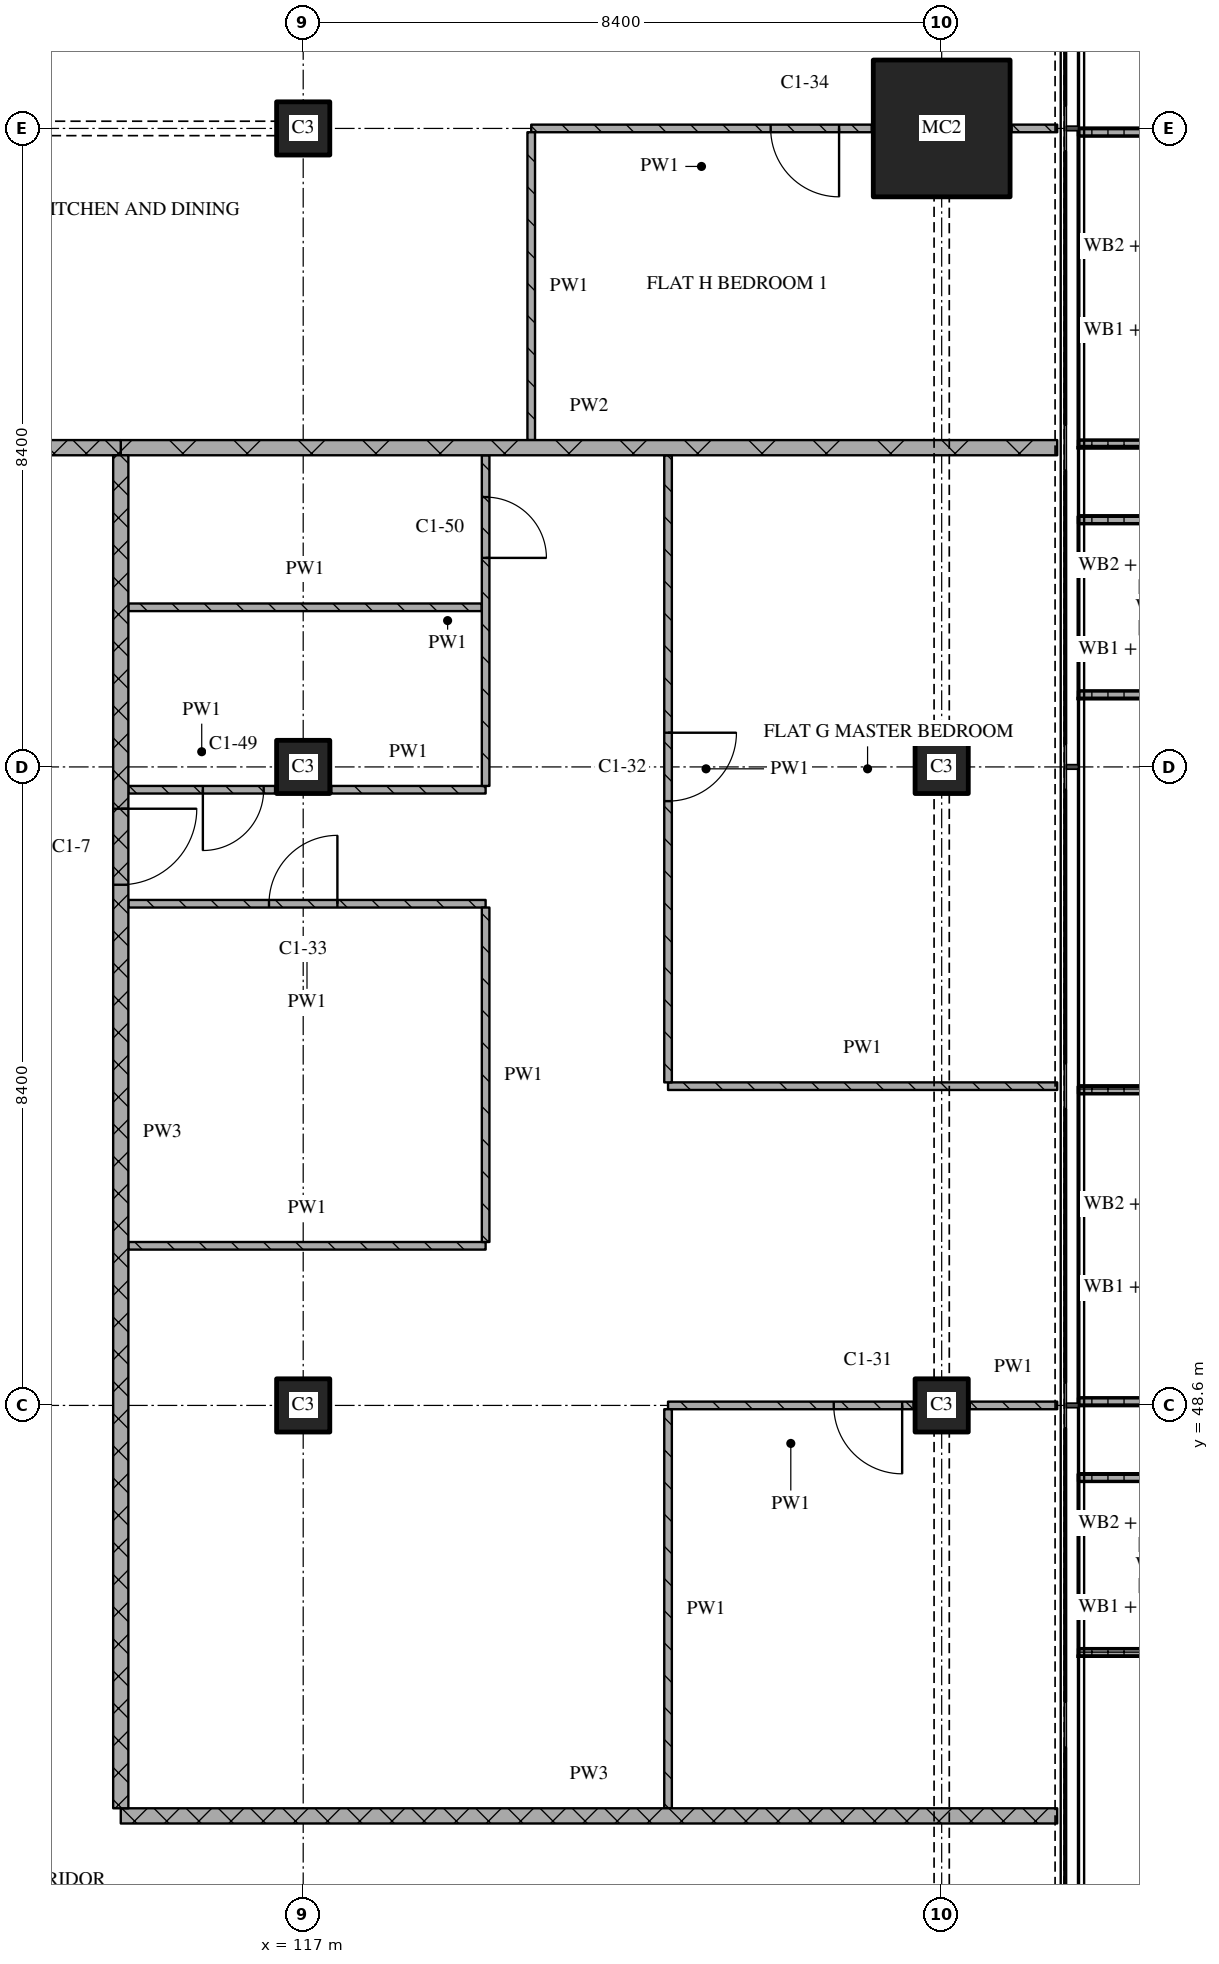
"""IFC4 building model, lengths in metres.
Left out: names, types, materials, properties, quantities, classifications, styles, units other than length and angle.
Written with IfcOpenShell. Run it as: python <this file> out.ifc"""

import sys

from ifc_helpers import new_model, si_unit, direction, frame, frame_2d, origin, origin_2d, place, context, subcontext, project, spatial, polyline, rectangle, outline, extrude, element, fill, save


model = new_model("IFC4")
c1 = context("Model", 3, precision=1e-05, world=origin(), true_north=direction((0.0, 1.0)))
c2 = subcontext(c1, "Body", "Model", "MODEL_VIEW")
j1 = project(units=[si_unit("LENGTHUNIT", "METRE"), si_unit("PLANEANGLEUNIT", "RADIAN")], contexts=[c1])
p1 = place(None, origin())
s1 = spatial("IfcSite", under=j1, at=p1, CompositionType="ELEMENT")
p2 = place(p1, origin())
s2 = spatial("IfcBuilding", under=s1, at=p2, CompositionType="ELEMENT")
p3 = place(p2, frame((0.0, 0.0, 151.05)))
s3 = spatial("IfcBuildingStorey", under=s2, at=p3, CompositionType="ELEMENT", Elevation=151.05)
for number, where, z_axis, x_axis in (
    (1, (117.0, 48.6, 0.0), (0.0, 0.0, 1.0), (1.0, 0.0, 0.0)),
    (2, (117.0, 57.0, 0.0), (0.0, 0.0, 1.0), (1.0, 0.0, 0.0)),
    (3, (117.0, 65.4, 0.0), (0.0, 0.0, 1.0), (1.0, 0.0, 0.0)),
    (4, (125.4, 48.6, 0.0), (0.0, 0.0, 1.0), (1.0, 0.0, 0.0)),
    (5, (125.4, 57.0, 0.0), (0.0, 0.0, 1.0), (1.0, 0.0, 0.0)),
):
    element("IfcColumn", number, at=place(p3, frame(where, z_axis=z_axis, x_axis=x_axis)), inside=s3, PredefinedType="COLUMN", context=c2, shape_type="SweptSolid", body=[
        extrude(rectangle(XDim=0.7, YDim=0.7, at=origin_2d()), origin(), (0.0, 0.0, 1.0), 3.6),
    ])
p4 = place(p3, frame((125.4, 65.4, 0.0), z_axis=(0.0, 0.0, 1.0), x_axis=(1.0, 0.0, 0.0)))
e6 = element("IfcColumn", 6, at=p4, inside=s3, PredefinedType="COLUMN", context=c2, shape_type="SweptSolid", body=[
    extrude(rectangle(XDim=1.8, YDim=1.8, at=origin_2d()), origin(), (0.0, 0.0, 1.0), 3.6),
])
p5 = place(p3, origin())
e7 = element("IfcWall", 7, at=p5, inside=s3, PredefinedType="SOLIDWALL", context=c2, shape_type="SweptSolid", body=[
    extrude(outline(polyline([(127.2, 45.3), (127.2, 45.4), (128.7, 45.4), (128.7, 47.6), (127.2, 47.6), (127.2, 47.7), (128.8, 47.7), (128.8, 45.3), (127.2, 45.3)])), origin(), (0.0, 0.0, 1.0), 1.0),
])
p6 = place(p3, origin())
e8 = element("IfcWall", 8, at=p6, inside=s3, PredefinedType="SOLIDWALL", context=c2, shape_type="SweptSolid", body=[
    extrude(outline(polyline([(127.2, 48.6), (127.2, 48.7), (128.833, 48.7), (128.833, 52.7), (127.2, 52.7), (127.2, 52.8), (128.933, 52.8), (128.933, 48.6), (127.2, 48.6)])), origin(), (0.0, 0.0, 1.0), 1.0),
])
p7 = place(p3, origin())
e9 = element("IfcWall", 9, at=p7, inside=s3, PredefinedType="SOLIDWALL", context=c2, shape_type="SweptSolid", body=[
    extrude(outline(polyline([(127.2, 57.9), (127.2, 58.0), (128.7, 58.0), (128.7, 60.2), (127.2, 60.2), (127.2, 60.3), (128.8, 60.3), (128.8, 57.9), (127.2, 57.9)])), origin(), (0.0, 0.0, 1.0), 1.0),
])
p8 = place(p3, origin())
e10 = element("IfcWall", 10, at=p8, inside=s3, PredefinedType="SOLIDWALL", context=c2, shape_type="SweptSolid", body=[
    extrude(outline(polyline([(127.2, 61.2), (127.2, 61.3), (128.833, 61.3), (128.833, 65.3), (127.2, 65.3), (127.2, 65.4), (128.933, 65.4), (128.933, 61.2), (127.2, 61.2)])), origin(), (0.0, 0.0, 1.0), 1.0),
])
p9 = place(p3, frame((114.6, 43.2, 0.0), z_axis=(0.0, 0.0, 1.0), x_axis=(1.0, 0.0, 0.0)))
e11 = element("IfcWall", 11, at=p9, inside=s3, PredefinedType="PARTITIONING", context=c2, shape_type="SweptSolid", body=[
    extrude(rectangle(XDim=12.32, YDim=0.2, at=frame_2d((6.16, 0.0))), origin(), (0.0, 0.0, 1.0), 3.32),
])
p10 = place(p3, frame((125.03, 48.6, 0.0), z_axis=(0.0, 0.0, 1.0), x_axis=(-1.0, 0.0, 0.0)))
e12 = element("IfcWall", 12, at=p10, inside=s3, PredefinedType="PARTITIONING", context=c2, shape_type="SweptSolid", body=[
    extrude(rectangle(XDim=3.23, YDim=0.1, at=frame_2d((1.615, 0.0))), origin(), (0.0, 0.0, 1.0), 3.32),
])
p11 = place(p10, frame((0.15, 0.0, 0.0)))
e13 = element("IfcOpeningElement", 13, at=p11, cuts=e12, PredefinedType="OPENING", context=c2, shape_type="SweptSolid", body=[
    extrude(rectangle(XDim=0.9, YDim=2.1, at=frame_2d((0.45, 1.05))), frame((0.0, 0.06, 0.0), z_axis=(0.0, -1.0, 0.0), x_axis=(1.0, 0.0, 0.0)), (0.0, 0.0, 1.0), 0.12),
])
p12 = place(p3, frame((125.77, 48.6, 0.0), z_axis=(0.0, 0.0, 1.0), x_axis=(1.0, 0.0, 0.0)))
e14 = element("IfcWall", 14, at=p12, inside=s3, PredefinedType="PARTITIONING", context=c2, shape_type="SweptSolid", body=[
    extrude(rectangle(XDim=1.15, YDim=0.1, at=frame_2d((0.575, 0.0))), origin(), (0.0, 0.0, 1.0), 3.32),
])
p13 = place(p3, frame((114.7, 50.7, 0.0), z_axis=(0.0, 0.0, 1.0), x_axis=(1.0, 0.0, 0.0)))
e15 = element("IfcWall", 15, at=p13, inside=s3, PredefinedType="PARTITIONING", context=c2, shape_type="SweptSolid", body=[
    extrude(rectangle(XDim=4.7, YDim=0.1, at=frame_2d((2.35, 0.0))), origin(), (0.0, 0.0, 1.0), 3.32),
])
p14 = place(p3, frame((121.8, 52.8, 0.0), z_axis=(0.0, 0.0, 1.0), x_axis=(1.0, 0.0, 0.0)))
e16 = element("IfcWall", 16, at=p14, inside=s3, PredefinedType="PARTITIONING", context=c2, shape_type="SweptSolid", body=[
    extrude(rectangle(XDim=5.12, YDim=0.1, at=frame_2d((2.56, 0.0))), origin(), (0.0, 0.0, 1.0), 3.32),
])
p15 = place(p3, frame((119.4, 55.2, 0.0), z_axis=(0.0, 0.0, 1.0), x_axis=(-1.0, 0.0, 0.0)))
e17 = element("IfcWall", 17, at=p15, inside=s3, PredefinedType="PARTITIONING", context=c2, shape_type="SweptSolid", body=[
    extrude(rectangle(XDim=4.7, YDim=0.1, at=frame_2d((2.35, 0.0))), origin(), (0.0, 0.0, 1.0), 3.32),
])
p16 = place(p15, frame((1.95, 0.0, 0.0)))
e18 = element("IfcOpeningElement", 18, at=p16, cuts=e17, PredefinedType="OPENING", context=c2, shape_type="SweptSolid", body=[
    extrude(rectangle(XDim=0.9, YDim=2.1, at=frame_2d((0.45, 1.05))), frame((0.0, 0.06, 0.0), z_axis=(0.0, -1.0, 0.0), x_axis=(1.0, 0.0, 0.0)), (0.0, 0.0, 1.0), 0.12),
])
p17 = place(p3, frame((114.7, 56.7, 0.0), z_axis=(0.0, 0.0, 1.0), x_axis=(1.0, 0.0, 0.0)))
e19 = element("IfcWall", 19, at=p17, inside=s3, PredefinedType="PARTITIONING", context=c2, shape_type="SweptSolid", body=[
    extrude(rectangle(XDim=1.93, YDim=0.1, at=frame_2d((0.965, 0.0))), origin(), (0.0, 0.0, 1.0), 3.32),
])
p18 = place(p17, frame((0.98, 0.0, 0.0)))
e20 = element("IfcOpeningElement", 20, at=p18, cuts=e19, PredefinedType="OPENING", context=c2, shape_type="SweptSolid", body=[
    extrude(rectangle(XDim=0.8, YDim=2.1, at=frame_2d((0.4, 1.05))), frame((0.0, 0.06, 0.0), z_axis=(0.0, -1.0, 0.0), x_axis=(1.0, 0.0, 0.0)), (0.0, 0.0, 1.0), 0.12),
])
p19 = place(p3, frame((117.37, 56.7, 0.0), z_axis=(0.0, 0.0, 1.0), x_axis=(1.0, 0.0, 0.0)))
e21 = element("IfcWall", 21, at=p19, inside=s3, PredefinedType="PARTITIONING", context=c2, shape_type="SweptSolid", body=[
    extrude(rectangle(XDim=2.03, YDim=0.1, at=frame_2d((1.015, 0.0))), origin(), (0.0, 0.0, 1.0), 3.32),
])
p20 = place(p3, frame((114.7, 59.1, 0.0), z_axis=(0.0, 0.0, 1.0), x_axis=(1.0, 0.0, 0.0)))
e22 = element("IfcWall", 22, at=p20, inside=s3, PredefinedType="PARTITIONING", context=c2, shape_type="SweptSolid", body=[
    extrude(rectangle(XDim=4.65, YDim=0.1, at=frame_2d((2.325, 0.0))), origin(), (0.0, 0.0, 1.0), 3.32),
])
p21 = place(p3, frame((111.0, 61.2, 0.0), z_axis=(0.0, 0.0, 1.0), x_axis=(1.0, 0.0, 0.0)))
e23 = element("IfcWall", 23, at=p21, inside=s3, PredefinedType="PARTITIONING", context=c2, shape_type="SweptSolid", body=[
    extrude(rectangle(XDim=3.6, YDim=0.2, at=frame_2d((1.8, 0.0))), origin(), (0.0, 0.0, 1.0), 3.32),
])
p22 = place(p3, frame((114.6, 61.2, 0.0), z_axis=(0.0, 0.0, 1.0), x_axis=(1.0, 0.0, 0.0)))
e24 = element("IfcWall", 24, at=p22, inside=s3, PredefinedType="PARTITIONING", context=c2, shape_type="SweptSolid", body=[
    extrude(rectangle(XDim=12.32, YDim=0.2, at=frame_2d((6.16, 0.0))), origin(), (0.0, 0.0, 1.0), 3.32),
])
p23 = place(p3, frame((124.48, 65.4, 0.0), z_axis=(0.0, 0.0, 1.0), x_axis=(-1.0, 0.0, 0.0)))
e25 = element("IfcWall", 25, at=p23, inside=s3, PredefinedType="PARTITIONING", context=c2, shape_type="SweptSolid", body=[
    extrude(rectangle(XDim=4.48, YDim=0.1, at=frame_2d((2.24, 0.0))), origin(), (0.0, 0.0, 1.0), 3.32),
])
p24 = place(p23, frame((0.43, 0.0, 0.0)))
e26 = element("IfcOpeningElement", 26, at=p24, cuts=e25, PredefinedType="OPENING", context=c2, shape_type="SweptSolid", body=[
    extrude(rectangle(XDim=0.9, YDim=2.1, at=frame_2d((0.45, 1.05))), frame((0.0, 0.06, 0.0), z_axis=(0.0, -1.0, 0.0), x_axis=(1.0, 0.0, 0.0)), (0.0, 0.0, 1.0), 0.12),
])
p25 = place(p3, frame((126.32, 65.4, 0.0), z_axis=(0.0, 0.0, 1.0), x_axis=(1.0, 0.0, 0.0)))
e27 = element("IfcWall", 27, at=p25, inside=s3, PredefinedType="PARTITIONING", context=c2, shape_type="SweptSolid", body=[
    extrude(rectangle(XDim=0.6, YDim=0.1, at=frame_2d((0.3, 0.0))), origin(), (0.0, 0.0, 1.0), 3.32),
])
p26 = place(p3, frame((114.6, 61.1, 0.0), z_axis=(0.0, 0.0, 1.0), x_axis=(0.0, -1.0, 0.0)))
e28 = element("IfcWall", 28, at=p26, inside=s3, PredefinedType="PARTITIONING", context=c2, shape_type="SweptSolid", body=[
    extrude(rectangle(XDim=17.8, YDim=0.2, at=frame_2d((8.9, 0.0))), origin(), (0.0, 0.0, 1.0), 3.32),
])
p27 = place(p26, frame((4.65, 0.0, 0.0)))
e29 = element("IfcOpeningElement", 29, at=p27, cuts=e28, PredefinedType="OPENING", context=c2, shape_type="SweptSolid", body=[
    extrude(rectangle(XDim=1.0, YDim=2.1, at=frame_2d((0.5, 1.05))), frame((0.0, 0.11, 0.0), z_axis=(0.0, -1.0, 0.0), x_axis=(1.0, 0.0, 0.0)), (0.0, 0.0, 1.0), 0.22),
])
p28 = place(p3, frame((119.4, 55.15, 0.0), z_axis=(0.0, 0.0, 1.0), x_axis=(0.0, -1.0, 0.0)))
e30 = element("IfcWall", 30, at=p28, inside=s3, PredefinedType="PARTITIONING", context=c2, shape_type="SweptSolid", body=[
    extrude(rectangle(XDim=4.4, YDim=0.1, at=frame_2d((2.2, 0.0))), origin(), (0.0, 0.0, 1.0), 3.32),
])
p29 = place(p3, frame((119.4, 56.75, 0.0), z_axis=(0.0, 0.0, 1.0), x_axis=(0.0, 1.0, 0.0)))
e31 = element("IfcWall", 31, at=p29, inside=s3, PredefinedType="PARTITIONING", context=c2, shape_type="SweptSolid", body=[
    extrude(rectangle(XDim=4.35, YDim=0.1, at=frame_2d((2.175, 0.0))), origin(), (0.0, 0.0, 1.0), 3.32),
])
p30 = place(p29, frame((3.0, 0.0, 0.0)))
e32 = element("IfcOpeningElement", 32, at=p30, cuts=e31, PredefinedType="OPENING", context=c2, shape_type="SweptSolid", body=[
    extrude(rectangle(XDim=0.8, YDim=2.1, at=frame_2d((0.4, 1.05))), frame((0.0, 0.06, 0.0), z_axis=(0.0, -1.0, 0.0), x_axis=(1.0, 0.0, 0.0)), (0.0, 0.0, 1.0), 0.12),
])
p31 = place(p3, frame((120.0, 65.35, 0.0), z_axis=(0.0, 0.0, 1.0), x_axis=(0.0, -1.0, 0.0)))
e33 = element("IfcWall", 33, at=p31, inside=s3, PredefinedType="PARTITIONING", context=c2, shape_type="SweptSolid", body=[
    extrude(rectangle(XDim=4.05, YDim=0.1, at=frame_2d((2.025, 0.0))), origin(), (0.0, 0.0, 1.0), 3.32),
])
p32 = place(p3, frame((121.8, 48.55, 0.0), z_axis=(0.0, 0.0, 1.0), x_axis=(0.0, -1.0, 0.0)))
e34 = element("IfcWall", 34, at=p32, inside=s3, PredefinedType="PARTITIONING", context=c2, shape_type="SweptSolid", body=[
    extrude(rectangle(XDim=5.25, YDim=0.1, at=frame_2d((2.625, 0.0))), origin(), (0.0, 0.0, 1.0), 3.32),
])
p33 = place(p3, frame((121.8, 61.1, 0.0), z_axis=(0.0, 0.0, 1.0), x_axis=(0.0, -1.0, 0.0)))
e35 = element("IfcWall", 35, at=p33, inside=s3, PredefinedType="PARTITIONING", context=c2, shape_type="SweptSolid", body=[
    extrude(rectangle(XDim=8.25, YDim=0.1, at=frame_2d((4.125, 0.0))), origin(), (0.0, 0.0, 1.0), 3.32),
])
p34 = place(p33, frame((3.65, 0.0, 0.0)))
e36 = element("IfcOpeningElement", 36, at=p34, cuts=e35, PredefinedType="OPENING", context=c2, shape_type="SweptSolid", body=[
    extrude(rectangle(XDim=0.9, YDim=2.1, at=frame_2d((0.45, 1.05))), frame((0.0, 0.06, 0.0), z_axis=(0.0, -1.0, 0.0), x_axis=(1.0, 0.0, 0.0)), (0.0, 0.0, 1.0), 0.12),
])
p35 = place(p11, origin())
e37 = element("IfcDoor", 37, at=p35, inside=s3, OperationType="SINGLE_SWING_LEFT", PredefinedType="DOOR", context=c2, shape_type="SweptSolid", body=[
    extrude(rectangle(XDim=0.9, YDim=2.1, at=frame_2d((0.45, 1.05))), frame((0.0, 0.025, 0.0), z_axis=(0.0, -1.0, 0.0), x_axis=(1.0, 0.0, 0.0)), (0.0, 0.0, 1.0), 0.05),
])
fill(e13, e37)
p36 = place(p16, origin())
e38 = element("IfcDoor", 38, at=p36, inside=s3, OperationType="SINGLE_SWING_RIGHT", PredefinedType="DOOR", context=c2, shape_type="SweptSolid", body=[
    extrude(rectangle(XDim=0.9, YDim=2.1, at=frame_2d((0.45, 1.05))), frame((0.0, 0.025, 0.0), z_axis=(0.0, -1.0, 0.0), x_axis=(1.0, 0.0, 0.0)), (0.0, 0.0, 1.0), 0.05),
])
fill(e18, e38)
p37 = place(p18, origin())
e39 = element("IfcDoor", 39, at=p37, inside=s3, OperationType="SINGLE_SWING_RIGHT", PredefinedType="DOOR", context=c2, shape_type="SweptSolid", body=[
    extrude(rectangle(XDim=0.8, YDim=2.1, at=frame_2d((0.4, 1.05))), frame((0.0, 0.025, 0.0), z_axis=(0.0, -1.0, 0.0), x_axis=(1.0, 0.0, 0.0)), (0.0, 0.0, 1.0), 0.05),
])
fill(e20, e39)
p38 = place(p24, origin())
e40 = element("IfcDoor", 40, at=p38, inside=s3, OperationType="SINGLE_SWING_LEFT", PredefinedType="DOOR", context=c2, shape_type="SweptSolid", body=[
    extrude(rectangle(XDim=0.9, YDim=2.1, at=frame_2d((0.45, 1.05))), frame((0.0, 0.025, 0.0), z_axis=(0.0, -1.0, 0.0), x_axis=(1.0, 0.0, 0.0)), (0.0, 0.0, 1.0), 0.05),
])
fill(e26, e40)
p39 = place(p27, origin())
e41 = element("IfcDoor", 41, at=p39, inside=s3, OperationType="SINGLE_SWING_LEFT", PredefinedType="DOOR", context=c2, shape_type="SweptSolid", body=[
    extrude(rectangle(XDim=1.0, YDim=2.1, at=frame_2d((0.5, 1.05))), frame((0.0, 0.025, 0.0), z_axis=(0.0, -1.0, 0.0), x_axis=(1.0, 0.0, 0.0)), (0.0, 0.0, 1.0), 0.05),
])
fill(e29, e41)
p40 = place(p30, origin())
e42 = element("IfcDoor", 42, at=p40, inside=s3, OperationType="SINGLE_SWING_RIGHT", PredefinedType="DOOR", context=c2, shape_type="SweptSolid", body=[
    extrude(rectangle(XDim=0.8, YDim=2.1, at=frame_2d((0.4, 1.05))), frame((0.0, 0.025, 0.0), z_axis=(0.0, -1.0, 0.0), x_axis=(1.0, 0.0, 0.0)), (0.0, 0.0, 1.0), 0.05),
])
fill(e32, e42)
p41 = place(p34, origin())
e43 = element("IfcDoor", 43, at=p41, inside=s3, OperationType="SINGLE_SWING_LEFT", PredefinedType="DOOR", context=c2, shape_type="SweptSolid", body=[
    extrude(rectangle(XDim=0.9, YDim=2.1, at=frame_2d((0.45, 1.05))), frame((0.0, 0.025, 0.0), z_axis=(0.0, -1.0, 0.0), x_axis=(1.0, 0.0, 0.0)), (0.0, 0.0, 1.0), 0.05),
])
fill(e36, e43)
save(model, sys.argv[1])
